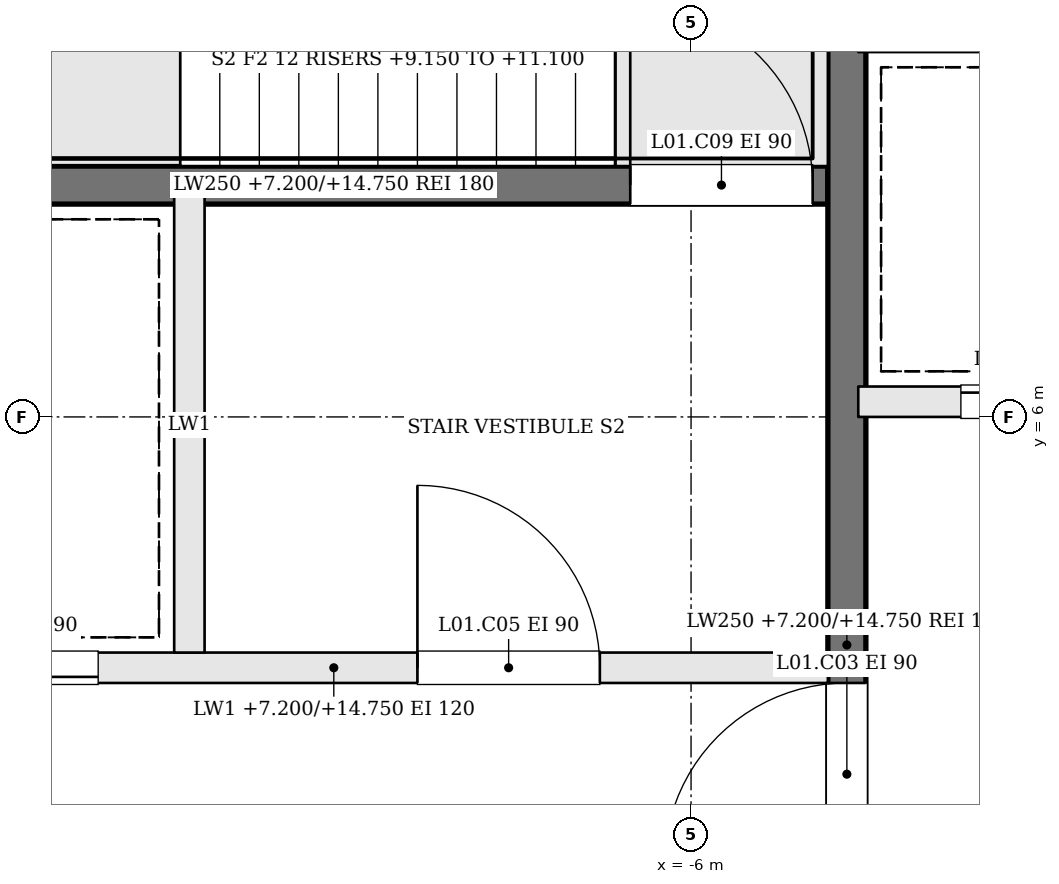
"""IFC4 building model, lengths in metres.
Left out: names, types, materials, properties, quantities, classifications, styles, units other than length and angle.
Written with IfcOpenShell. Run it as: python <this file> out.ifc"""

import sys

from ifc_helpers import new_model, si_unit, direction, frame, frame_2d, origin, place, context, subcontext, project, spatial, rectangle, extrude, element, fill, save


model = new_model("IFC4")
c1 = context("Model", 3, precision=1e-05, world=origin(), true_north=direction((0.0, 1.0)))
c2 = subcontext(c1, "Body", "Model", "MODEL_VIEW")
j1 = project(units=[si_unit("LENGTHUNIT", "METRE"), si_unit("PLANEANGLEUNIT", "RADIAN")], contexts=[c1])
p1 = place(None, origin())
s1 = spatial("IfcSite", under=j1, at=p1, CompositionType="ELEMENT")
p2 = place(p1, origin())
s2 = spatial("IfcBuilding", under=s1, at=p2, CompositionType="ELEMENT")
p3 = place(p2, frame((0.0, 0.0, 7.2)))
s3 = spatial("IfcBuildingStorey", under=s2, at=p3, CompositionType="ELEMENT", Elevation=7.2)
p4 = place(p3, frame((-11.6, 4.35, 0.0), z_axis=(0.0, 0.0, 1.0), x_axis=(1.0, 0.0, 0.0)))
e1 = element("IfcWall", 1, at=p4, inside=s3, PredefinedType="SOLIDWALL", context=c2, shape_type="SweptSolid", body=[
    extrude(rectangle(XDim=6.5, YDim=0.2, at=frame_2d((3.25, 0.0))), origin(), (0.0, 0.0, 1.0), 7.55),
])
p5 = place(p4, frame((3.8, 0.0, 0.0)))
e2 = element("IfcOpeningElement", 2, at=p5, cuts=e1, PredefinedType="OPENING", context=c2, shape_type="SweptSolid", body=[
    extrude(rectangle(XDim=1.2, YDim=2.1, at=frame_2d((0.6, 1.05))), frame((0.0, 0.11, 0.0), z_axis=(0.0, -1.0, 0.0), x_axis=(1.0, 0.0, 0.0)), (0.0, 0.0, 1.0), 0.22),
])
p6 = place(p4, frame((0.5, 0.0, 0.0)))
e3 = element("IfcOpeningElement", 3, at=p6, cuts=e1, PredefinedType="OPENING", context=c2, shape_type="SweptSolid", body=[
    extrude(rectangle(XDim=1.2, YDim=2.1, at=frame_2d((0.6, 1.05))), frame((0.0, 0.11, 0.0), z_axis=(0.0, -1.0, 0.0), x_axis=(1.0, 0.0, 0.0)), (0.0, 0.0, 1.0), 0.22),
])
p7 = place(p3, frame((-11.6, 7.525, 0.0), z_axis=(0.0, 0.0, 1.0), x_axis=(1.0, 0.0, 0.0)))
e4 = element("IfcWall", 4, at=p7, inside=s3, PredefinedType="SOLIDWALL", context=c2, shape_type="SweptSolid", body=[
    extrude(rectangle(XDim=6.5, YDim=0.25, at=frame_2d((3.25, 0.0))), origin(), (0.0, 0.0, 1.0), 7.55),
])
p8 = place(p7, frame((5.2, 0.0, 0.0)))
e5 = element("IfcOpeningElement", 5, at=p8, cuts=e4, PredefinedType="OPENING", context=c2, shape_type="SweptSolid", body=[
    extrude(rectangle(XDim=1.2, YDim=2.1, at=frame_2d((0.6, 1.05))), frame((0.0, 0.135, 0.0), z_axis=(0.0, -1.0, 0.0), x_axis=(1.0, 0.0, 0.0)), (0.0, 0.0, 1.0), 0.27),
])
p9 = place(p3, frame((-9.3, 4.45, 0.0), z_axis=(0.0, 0.0, 1.0), x_axis=(0.0, 1.0, 0.0)))
e6 = element("IfcWall", 6, at=p9, inside=s3, PredefinedType="SOLIDWALL", context=c2, shape_type="SweptSolid", body=[
    extrude(rectangle(XDim=3.0, YDim=0.2, at=frame_2d((1.5, 0.0))), origin(), (0.0, 0.0, 1.0), 7.55),
])
p10 = place(p3, frame((-4.975, -1.6, 0.0), z_axis=(0.0, 0.0, 1.0), x_axis=(0.0, 1.0, 0.0)))
e7 = element("IfcWall", 7, at=p10, inside=s3, PredefinedType="SOLIDWALL", context=c2, shape_type="SweptSolid", body=[
    extrude(rectangle(XDim=12.2, YDim=0.25, at=frame_2d((6.1, 0.0))), origin(), (0.0, 0.0, 1.0), 7.55),
])
p11 = place(p10, frame((4.65, 0.0, 0.0)))
e8 = element("IfcOpeningElement", 8, at=p11, cuts=e7, PredefinedType="OPENING", context=c2, shape_type="SweptSolid", body=[
    extrude(rectangle(XDim=1.2, YDim=2.1, at=frame_2d((0.6, 1.05))), frame((0.0, 0.135, 0.0), z_axis=(0.0, -1.0, 0.0), x_axis=(1.0, 0.0, 0.0)), (0.0, 0.0, 1.0), 0.27),
])
p12 = place(p3, frame((-4.9, 6.1, 0.0), z_axis=(0.0, 0.0, 1.0), x_axis=(1.0, 0.0, 0.0)))
e9 = element("IfcWall", 9, at=p12, inside=s3, PredefinedType="SOLIDWALL", context=c2, shape_type="SweptSolid", body=[
    extrude(rectangle(XDim=9.8, YDim=0.2, at=frame_2d((4.9, 0.0))), origin(), (0.0, 0.0, 1.0), 7.55),
])
p13 = place(p12, frame((0.675, 0.0, 0.0)))
e10 = element("IfcOpeningElement", 10, at=p13, cuts=e9, PredefinedType="OPENING", context=c2, shape_type="SweptSolid", body=[
    extrude(rectangle(XDim=1.1, YDim=2.1, at=frame_2d((0.55, 1.05))), frame((0.0, 0.11, 0.0), z_axis=(0.0, -1.0, 0.0), x_axis=(1.0, 0.0, 0.0)), (0.0, 0.0, 1.0), 0.22),
])
p14 = place(p12, frame((3.125, 0.0, 0.0)))
e11 = element("IfcOpeningElement", 11, at=p14, cuts=e9, PredefinedType="OPENING", context=c2, shape_type="SweptSolid", body=[
    extrude(rectangle(XDim=1.1, YDim=2.1, at=frame_2d((0.55, 1.05))), frame((0.0, 0.11, 0.0), z_axis=(0.0, -1.0, 0.0), x_axis=(1.0, 0.0, 0.0)), (0.0, 0.0, 1.0), 0.22),
])
p15 = place(p12, frame((5.575, 0.0, 0.0)))
e12 = element("IfcOpeningElement", 12, at=p15, cuts=e9, PredefinedType="OPENING", context=c2, shape_type="SweptSolid", body=[
    extrude(rectangle(XDim=1.1, YDim=2.1, at=frame_2d((0.55, 1.05))), frame((0.0, 0.11, 0.0), z_axis=(0.0, -1.0, 0.0), x_axis=(1.0, 0.0, 0.0)), (0.0, 0.0, 1.0), 0.22),
])
p16 = place(p12, frame((8.025, 0.0, 0.0)))
e13 = element("IfcOpeningElement", 13, at=p16, cuts=e9, PredefinedType="OPENING", context=c2, shape_type="SweptSolid", body=[
    extrude(rectangle(XDim=1.1, YDim=2.1, at=frame_2d((0.55, 1.05))), frame((0.0, 0.11, 0.0), z_axis=(0.0, -1.0, 0.0), x_axis=(1.0, 0.0, 0.0)), (0.0, 0.0, 1.0), 0.22),
])
p17 = place(p11, origin())
e14 = element("IfcDoor", 14, at=p17, inside=s3, OperationType="SINGLE_SWING_LEFT", PredefinedType="DOOR", context=c2, shape_type="SweptSolid", body=[
    extrude(rectangle(XDim=1.2, YDim=2.1, at=frame_2d((0.6, 1.05))), frame((0.0, 0.025, 0.0), z_axis=(0.0, -1.0, 0.0), x_axis=(1.0, 0.0, 0.0)), (0.0, 0.0, 1.0), 0.05),
])
fill(e8, e14)
p18 = place(p5, origin())
e15 = element("IfcDoor", 15, at=p18, inside=s3, OperationType="SINGLE_SWING_LEFT", PredefinedType="DOOR", context=c2, shape_type="SweptSolid", body=[
    extrude(rectangle(XDim=1.2, YDim=2.1, at=frame_2d((0.6, 1.05))), frame((0.0, 0.025, 0.0), z_axis=(0.0, -1.0, 0.0), x_axis=(1.0, 0.0, 0.0)), (0.0, 0.0, 1.0), 0.05),
])
fill(e2, e15)
p19 = place(p8, origin())
e16 = element("IfcDoor", 16, at=p19, inside=s3, OperationType="SINGLE_SWING_LEFT", PredefinedType="DOOR", context=c2, shape_type="SweptSolid", body=[
    extrude(rectangle(XDim=1.2, YDim=2.1, at=frame_2d((0.6, 1.05))), frame((0.0, 0.025, 0.0), z_axis=(0.0, -1.0, 0.0), x_axis=(1.0, 0.0, 0.0)), (0.0, 0.0, 1.0), 0.05),
])
fill(e5, e16)
p20 = place(p6, origin())
e17 = element("IfcDoor", 17, at=p20, inside=s3, OperationType="SLIDING_TO_RIGHT", PredefinedType="DOOR", context=c2, shape_type="SweptSolid", body=[
    extrude(rectangle(XDim=1.2, YDim=2.1, at=frame_2d((0.6, 1.05))), frame((0.0, 0.025, 0.0), z_axis=(0.0, -1.0, 0.0), x_axis=(1.0, 0.0, 0.0)), (0.0, 0.0, 1.0), 0.05),
])
fill(e3, e17)
p21 = place(p13, origin())
e18 = element("IfcDoor", 18, at=p21, inside=s3, OperationType="SLIDING_TO_RIGHT", PredefinedType="DOOR", context=c2, shape_type="SweptSolid", body=[
    extrude(rectangle(XDim=1.1, YDim=2.1, at=frame_2d((0.55, 1.05))), frame((0.0, 0.025, 0.0), z_axis=(0.0, -1.0, 0.0), x_axis=(1.0, 0.0, 0.0)), (0.0, 0.0, 1.0), 0.05),
])
fill(e10, e18)
save(model, sys.argv[1])
